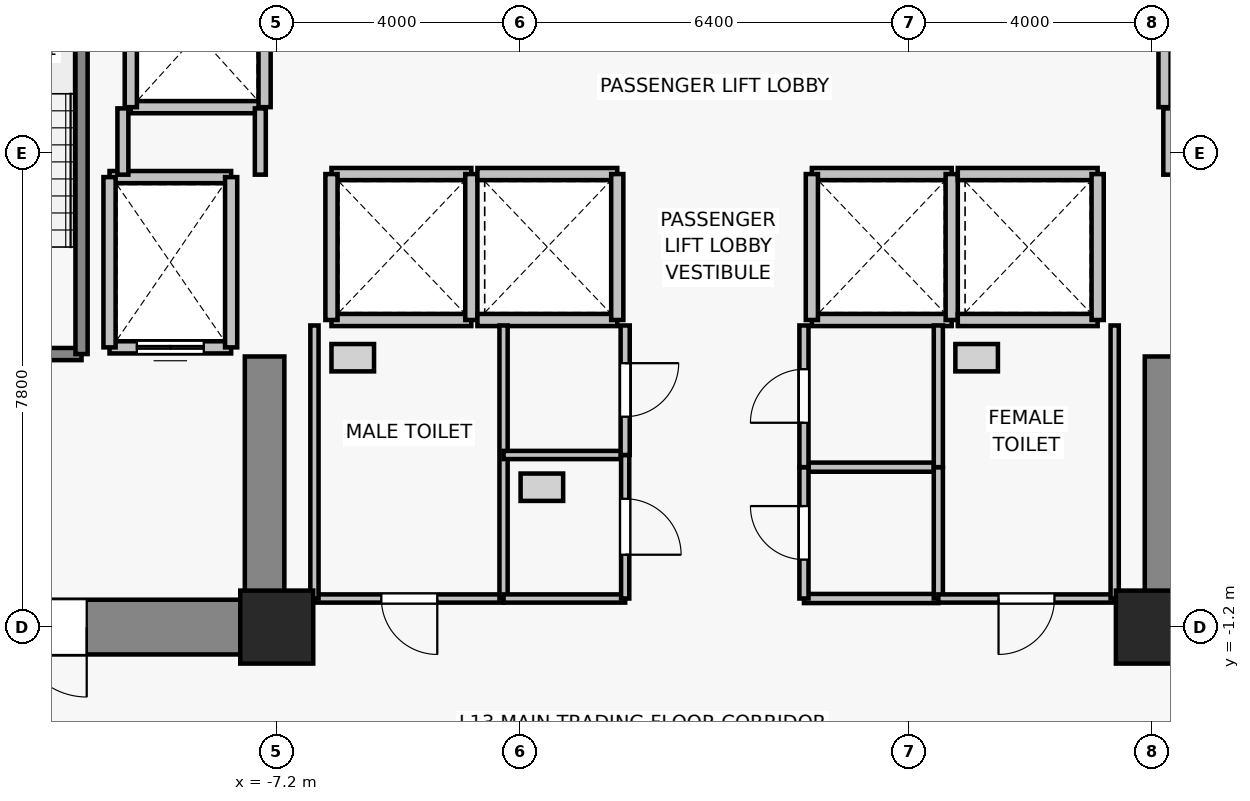
"""IFC4 building model, lengths in metres.
Left out: names, types, materials, properties, quantities, classifications, styles, units other than length and angle.
Written with IfcOpenShell. Run it as: python <this file> out.ifc"""

import sys

from ifc_helpers import new_model, si_unit, direction, frame, frame_2d, origin, origin_2d, place, context, subcontext, project, spatial, rectangle, extrude, source, transform, mapped, element, fill, save


model = new_model("IFC4")
c1 = context("Model", 3, precision=1e-05, world=origin(), true_north=direction((0.0, 1.0)))
c2 = subcontext(c1, "Body", "Model", "MODEL_VIEW")
j1 = project(units=[si_unit("LENGTHUNIT", "METRE"), si_unit("PLANEANGLEUNIT", "RADIAN")], contexts=[c1])
p1 = place(None, origin())
s1 = spatial("IfcSite", under=j1, at=p1, CompositionType="ELEMENT")
p2 = place(p1, origin())
s2 = spatial("IfcBuilding", under=s1, at=p2, CompositionType="ELEMENT")
p3 = place(p2, frame((0.0, 0.0, 50.5)))
s3 = spatial("IfcBuildingStorey", under=s2, at=p3, CompositionType="ELEMENT", Elevation=50.5)
for number, where, z_axis, x_axis in (
    (1, (-7.2, -1.2, 0.0), (0.0, 0.0, 1.0), (1.0, 0.0, 0.0)),
    (2, (7.2, -1.2, 0.0), (0.0, 0.0, 1.0), (1.0, 0.0, 0.0)),
):
    element("IfcColumn", number, at=place(p3, frame(where, z_axis=z_axis, x_axis=x_axis)), inside=s3, PredefinedType="COLUMN", context=c2, shape_type="SweptSolid", body=[
        extrude(rectangle(XDim=1.2, YDim=1.2, at=origin_2d()), origin(), (0.0, 0.0, 1.0), 3.3),
    ])
p4 = place(p3, frame((-7.8, -1.2, 0.0), z_axis=(0.0, 0.0, 1.0), x_axis=(-1.0, 0.0, 0.0)))
e3 = element("IfcWall", 3, at=p4, inside=s3, PredefinedType="SHEAR", context=c2, shape_type="SweptSolid", body=[
    extrude(rectangle(XDim=6.0, YDim=0.9, at=frame_2d((3.0, 0.0))), origin(), (0.0, 0.0, 1.0), 3.075),
])
p5 = place(p4, frame((2.525, 0.0, 0.0)))
e4 = element("IfcOpeningElement", 4, at=p5, cuts=e3, PredefinedType="OPENING", context=c2, shape_type="SweptSolid", body=[
    extrude(rectangle(XDim=1.15, YDim=2.15, at=frame_2d((0.575, 1.075))), frame((0.0, 0.46, 0.0), z_axis=(0.0, -1.0, 0.0), x_axis=(1.0, 0.0, 0.0)), (0.0, 0.0, 1.0), 0.92),
])
for number, where, z_axis, x_axis in (
    (5, (-7.4, -0.75, 0.0), (0.0, 0.0, 1.0), (0.0, 1.0, 0.0)),
    (6, (7.4, -0.75, 0.0), (0.0, 0.0, 1.0), (0.0, 1.0, 0.0)),
):
    element("IfcWall", number, at=place(p3, frame(where, z_axis=z_axis, x_axis=x_axis)), inside=s3, PredefinedType="SHEAR", context=c2, shape_type="SweptSolid", body=[
        extrude(rectangle(XDim=4.0, YDim=0.65, at=frame_2d((2.0, 0.0))), origin(), (0.0, 0.0, 1.0), 3.075),
    ])
p6 = place(p3, frame((-7.95, 3.4, 0.0), z_axis=(0.0, 0.0, 1.0), x_axis=(-1.0, 0.0, 0.0)))
e7 = element("IfcWall", 7, at=p6, inside=s3, PredefinedType="SOLIDWALL", context=c2, shape_type="SweptSolid", body=[
    extrude(rectangle(XDim=2.0, YDim=0.2, at=frame_2d((1.0, 0.0))), origin(), (0.0, 0.0, 1.0), 3.075),
])
p7 = place(p6, frame((0.45, 0.0, 0.0)))
e8 = element("IfcOpeningElement", 8, at=p7, cuts=e7, PredefinedType="OPENING", context=c2, shape_type="SweptSolid", body=[
    extrude(rectangle(XDim=1.1, YDim=2.2, at=frame_2d((0.55, 1.1))), frame((0.0, 0.11, 0.0), z_axis=(0.0, -1.0, 0.0), x_axis=(1.0, 0.0, 0.0)), (0.0, 0.0, 1.0), 0.22),
])
p8 = place(p3, frame((-9.95, 6.2, 0.0), z_axis=(0.0, 0.0, 1.0), x_axis=(1.0, 0.0, 0.0)))
e9 = element("IfcWall", 9, at=p8, inside=s3, PredefinedType="SOLIDWALL", context=c2, shape_type="SweptSolid", body=[
    extrude(rectangle(XDim=2.0, YDim=0.2, at=frame_2d((1.0, 0.0))), origin(), (0.0, 0.0, 1.0), 3.075),
])
for number, where, z_axis, x_axis in (
    (10, (-9.95, 3.4, 0.0), (0.0, 0.0, 1.0), (0.0, 1.0, 0.0)),
    (11, (-7.95, 6.2, 0.0), (0.0, 0.0, 1.0), (0.0, -1.0, 0.0)),
):
    element("IfcWall", number, at=place(p3, frame(where, z_axis=z_axis, x_axis=x_axis)), inside=s3, PredefinedType="SOLIDWALL", context=c2, shape_type="SweptSolid", body=[
        extrude(rectangle(XDim=2.8, YDim=0.2, at=frame_2d((1.4, 0.0))), origin(), (0.0, 0.0, 1.0), 3.075),
    ])
for number, where, z_axis, x_axis in (
    (12, (-4.0, 3.85, 0.0), (0.0, 0.0, 1.0), (-1.0, 0.0, 0.0)),
    (13, (-6.3, 6.25, 0.0), (0.0, 0.0, 1.0), (1.0, 0.0, 0.0)),
):
    element("IfcWall", number, at=place(p3, frame(where, z_axis=z_axis, x_axis=x_axis)), inside=s3, PredefinedType="SOLIDWALL", context=c2, shape_type="SweptSolid", body=[
        extrude(rectangle(XDim=2.3, YDim=0.2, at=frame_2d((1.15, 0.0))), origin(), (0.0, 0.0, 1.0), 3.075),
    ])
for number, where, z_axis, x_axis in (
    (14, (-6.3, 3.85, 0.0), (0.0, 0.0, 1.0), (0.0, 1.0, 0.0)),
    (15, (-4.0, 6.25, 0.0), (0.0, 0.0, 1.0), (0.0, -1.0, 0.0)),
):
    element("IfcWall", number, at=place(p3, frame(where, z_axis=z_axis, x_axis=x_axis)), inside=s3, PredefinedType="SOLIDWALL", context=c2, shape_type="SweptSolid", body=[
        extrude(rectangle(XDim=2.4, YDim=0.2, at=frame_2d((1.2, 0.0))), origin(), (0.0, 0.0, 1.0), 3.075),
    ])
for number, where, z_axis, x_axis in (
    (16, (-1.6, 3.85, 0.0), (0.0, 0.0, 1.0), (-1.0, 0.0, 0.0)),
    (17, (-3.9, 6.25, 0.0), (0.0, 0.0, 1.0), (1.0, 0.0, 0.0)),
):
    element("IfcWall", number, at=place(p3, frame(where, z_axis=z_axis, x_axis=x_axis)), inside=s3, PredefinedType="SOLIDWALL", context=c2, shape_type="SweptSolid", body=[
        extrude(rectangle(XDim=2.3, YDim=0.2, at=frame_2d((1.15, 0.0))), origin(), (0.0, 0.0, 1.0), 3.075),
    ])
p9 = place(p3, frame((-1.6, 6.25, 0.0), z_axis=(0.0, 0.0, 1.0), x_axis=(0.0, -1.0, 0.0)))
e18 = element("IfcWall", 18, at=p9, inside=s3, PredefinedType="SOLIDWALL", context=c2, shape_type="SweptSolid", body=[
    extrude(rectangle(XDim=2.4, YDim=0.2, at=frame_2d((1.2, 0.0))), origin(), (0.0, 0.0, 1.0), 3.075),
])
for number, where, z_axis, x_axis in (
    (19, (3.9, 3.85, 0.0), (0.0, 0.0, 1.0), (-1.0, 0.0, 0.0)),
    (20, (1.6, 6.25, 0.0), (0.0, 0.0, 1.0), (1.0, 0.0, 0.0)),
):
    element("IfcWall", number, at=place(p3, frame(where, z_axis=z_axis, x_axis=x_axis)), inside=s3, PredefinedType="SOLIDWALL", context=c2, shape_type="SweptSolid", body=[
        extrude(rectangle(XDim=2.3, YDim=0.2, at=frame_2d((1.15, 0.0))), origin(), (0.0, 0.0, 1.0), 3.075),
    ])
for number, where, z_axis, x_axis in (
    (21, (1.6, 3.85, 0.0), (0.0, 0.0, 1.0), (0.0, 1.0, 0.0)),
    (22, (3.9, 6.25, 0.0), (0.0, 0.0, 1.0), (0.0, -1.0, 0.0)),
):
    element("IfcWall", number, at=place(p3, frame(where, z_axis=z_axis, x_axis=x_axis)), inside=s3, PredefinedType="SOLIDWALL", context=c2, shape_type="SweptSolid", body=[
        extrude(rectangle(XDim=2.4, YDim=0.2, at=frame_2d((1.2, 0.0))), origin(), (0.0, 0.0, 1.0), 3.075),
    ])
for number, where, z_axis, x_axis in (
    (23, (6.3, 3.85, 0.0), (0.0, 0.0, 1.0), (-1.0, 0.0, 0.0)),
    (24, (4.0, 6.25, 0.0), (0.0, 0.0, 1.0), (1.0, 0.0, 0.0)),
):
    element("IfcWall", number, at=place(p3, frame(where, z_axis=z_axis, x_axis=x_axis)), inside=s3, PredefinedType="SOLIDWALL", context=c2, shape_type="SweptSolid", body=[
        extrude(rectangle(XDim=2.3, YDim=0.2, at=frame_2d((1.15, 0.0))), origin(), (0.0, 0.0, 1.0), 3.075),
    ])
p10 = place(p3, frame((6.3, 6.25, 0.0), z_axis=(0.0, 0.0, 1.0), x_axis=(0.0, -1.0, 0.0)))
e25 = element("IfcWall", 25, at=p10, inside=s3, PredefinedType="SOLIDWALL", context=c2, shape_type="SweptSolid", body=[
    extrude(rectangle(XDim=2.4, YDim=0.2, at=frame_2d((1.2, 0.0))), origin(), (0.0, 0.0, 1.0), 3.075),
])
p11 = place(p3, frame((-7.4, 7.35, 0.0), z_axis=(0.0, 0.0, 1.0), x_axis=(-1.0, 0.0, 0.0)))
e26 = element("IfcWall", 26, at=p11, inside=s3, PredefinedType="SOLIDWALL", context=c2, shape_type="SweptSolid", body=[
    extrude(rectangle(XDim=2.2, YDim=0.2, at=frame_2d((1.1, 0.0))), origin(), (0.0, 0.0, 1.0), 2.465),
])
p12 = place(p3, frame((-9.6, 7.35, 0.0), z_axis=(0.0, 0.0, 1.0), x_axis=(0.0, 1.0, 0.0)))
e27 = element("IfcWall", 27, at=p12, inside=s3, PredefinedType="SOLIDWALL", context=c2, shape_type="SweptSolid", body=[
    extrude(rectangle(XDim=2.4, YDim=0.2, at=frame_2d((1.2, 0.0))), origin(), (0.0, 0.0, 1.0), 3.075),
])
p13 = place(p3, frame((-7.4, 9.75, 0.0), z_axis=(0.0, 0.0, 1.0), x_axis=(0.0, -1.0, 0.0)))
e28 = element("IfcWall", 28, at=p13, inside=s3, PredefinedType="SOLIDWALL", context=c2, shape_type="SweptSolid", body=[
    extrude(rectangle(XDim=2.4, YDim=0.2, at=frame_2d((1.2, 0.0))), origin(), (0.0, 0.0, 1.0), 2.465),
])
p14 = place(p3, frame((9.6, 7.35, 0.0), z_axis=(0.0, 0.0, 1.0), x_axis=(-1.0, 0.0, 0.0)))
e29 = element("IfcWall", 29, at=p14, inside=s3, PredefinedType="SOLIDWALL", context=c2, shape_type="SweptSolid", body=[
    extrude(rectangle(XDim=2.2, YDim=0.2, at=frame_2d((1.1, 0.0))), origin(), (0.0, 0.0, 1.0), 2.465),
])
p15 = place(p3, frame((7.4, 7.35, 0.0), z_axis=(0.0, 0.0, 1.0), x_axis=(0.0, 1.0, 0.0)))
e30 = element("IfcWall", 30, at=p15, inside=s3, PredefinedType="SOLIDWALL", context=c2, shape_type="SweptSolid", body=[
    extrude(rectangle(XDim=2.4, YDim=0.2, at=frame_2d((1.2, 0.0))), origin(), (0.0, 0.0, 1.0), 2.465),
])
p16 = place(p3, frame((-10.41, 3.29, 0.0), z_axis=(0.0, 0.0, 1.0), x_axis=(-1.0, 0.0, 0.0)))
e31 = element("IfcWall", 31, at=p16, inside=s3, PredefinedType="SOLIDWALL", context=c2, shape_type="SweptSolid", body=[
    extrude(rectangle(XDim=3.52, YDim=0.2, at=frame_2d((1.76, 0.0))), origin(), (0.0, 0.0, 1.0), 3.075),
])
p17 = place(p16, frame((1.165, 0.0, 0.0)))
e32 = element("IfcOpeningElement", 32, at=p17, cuts=e31, PredefinedType="OPENING", context=c2, shape_type="SweptSolid", body=[
    extrude(rectangle(XDim=1.15, YDim=2.15, at=frame_2d((0.575, 1.075))), frame((0.0, 0.11, 0.0), z_axis=(0.0, -1.0, 0.0), x_axis=(1.0, 0.0, 0.0)), (0.0, 0.0, 1.0), 0.22),
])
p18 = place(p3, frame((-10.41, 12.13, 0.0), z_axis=(0.0, 0.0, 1.0), x_axis=(0.0, -1.0, 0.0)))
e33 = element("IfcWall", 33, at=p18, inside=s3, PredefinedType="SOLIDWALL", context=c2, shape_type="SweptSolid", body=[
    extrude(rectangle(XDim=8.84, YDim=0.2, at=frame_2d((4.42, 0.0))), origin(), (0.0, 0.0, 1.0), 3.075),
])
p19 = place(p3, frame((-9.73, 6.24, 0.0), z_axis=(0.0, 0.0, 1.0), x_axis=(0.0, 1.0, 0.0)))
e34 = element("IfcWall", 34, at=p19, inside=s3, PredefinedType="PARTITIONING", context=c2, shape_type="SweptSolid", body=[
    extrude(rectangle(XDim=1.09, YDim=0.18, at=frame_2d((0.545, 0.0))), origin(), (0.0, 0.0, 1.0), 3.075),
])
for number, where, z_axis, x_axis in (
    (35, (-7.47, 7.33, 0.0), (0.0, 0.0, 1.0), (0.0, -1.0, 0.0)),
    (36, (7.47, 6.24, 0.0), (0.0, 0.0, 1.0), (0.0, 1.0, 0.0)),
):
    element("IfcWall", number, at=place(p3, frame(where, z_axis=z_axis, x_axis=x_axis)), inside=s3, PredefinedType="PARTITIONING", context=c2, shape_type="SweptSolid", body=[
        extrude(rectangle(XDim=1.09, YDim=0.18, at=frame_2d((0.545, 0.0))), origin(), (0.0, 0.0, 1.0), 2.465),
    ])
p20 = place(p3, frame((-3.47, -0.73, 0.0), z_axis=(0.0, 0.0, 1.0), x_axis=(-1.0, 0.0, 0.0)))
e37 = element("IfcWall", 37, at=p20, inside=s3, PredefinedType="PARTITIONING", context=c2, shape_type="SweptSolid", body=[
    extrude(rectangle(XDim=3.11, YDim=0.135, at=frame_2d((1.555, 0.0))), origin(), (0.0, 0.0, 1.0), 3.075),
])
p21 = place(p20, frame((1.09, 0.0, 0.0)))
e38 = element("IfcOpeningElement", 38, at=p21, cuts=e37, PredefinedType="OPENING", context=c2, shape_type="SweptSolid", body=[
    extrude(rectangle(XDim=0.92, YDim=2.1, at=frame_2d((0.46, 1.05))), frame((0.0, 0.077, 0.0), z_axis=(0.0, -1.0, 0.0), x_axis=(1.0, 0.0, 0.0)), (0.0, 0.0, 1.0), 0.155),
])
for number, where, z_axis, x_axis in (
    (39, (-6.58, -0.73, 0.0), (0.0, 0.0, 1.0), (0.0, 1.0, 0.0)),
    (40, (-3.47, 3.76, 0.0), (0.0, 0.0, 1.0), (0.0, -1.0, 0.0)),
):
    element("IfcWall", number, at=place(p3, frame(where, z_axis=z_axis, x_axis=x_axis)), inside=s3, PredefinedType="PARTITIONING", context=c2, shape_type="SweptSolid", body=[
        extrude(rectangle(XDim=4.49, YDim=0.135, at=frame_2d((2.245, 0.0))), origin(), (0.0, 0.0, 1.0), 3.075),
    ])
for number, where, z_axis, x_axis in (
    (41, (-1.47, -0.73, 0.0), (0.0, 0.0, 1.0), (-1.0, 0.0, 0.0)),
    (42, (-3.47, 1.63, 0.0), (0.0, 0.0, 1.0), (1.0, 0.0, 0.0)),
):
    element("IfcWall", number, at=place(p3, frame(where, z_axis=z_axis, x_axis=x_axis)), inside=s3, PredefinedType="PARTITIONING", context=c2, shape_type="SweptSolid", body=[
        extrude(rectangle(XDim=2.0, YDim=0.135, at=frame_2d((1.0, 0.0))), origin(), (0.0, 0.0, 1.0), 3.075),
    ])
p22 = place(p3, frame((-1.47, 1.63, 0.0), z_axis=(0.0, 0.0, 1.0), x_axis=(0.0, -1.0, 0.0)))
e43 = element("IfcWall", 43, at=p22, inside=s3, PredefinedType="PARTITIONING", context=c2, shape_type="SweptSolid", body=[
    extrude(rectangle(XDim=2.36, YDim=0.135, at=frame_2d((1.18, 0.0))), origin(), (0.0, 0.0, 1.0), 3.075),
])
p23 = place(p22, frame((0.72, 0.0, 0.0)))
e44 = element("IfcOpeningElement", 44, at=p23, cuts=e43, PredefinedType="OPENING", context=c2, shape_type="SweptSolid", body=[
    extrude(rectangle(XDim=0.92, YDim=2.1, at=frame_2d((0.46, 1.05))), frame((0.0, 0.077, 0.0), z_axis=(0.0, -1.0, 0.0), x_axis=(1.0, 0.0, 0.0)), (0.0, 0.0, 1.0), 0.155),
])
p24 = place(p3, frame((-1.47, 3.76, 0.0), z_axis=(0.0, 0.0, 1.0), x_axis=(0.0, -1.0, 0.0)))
e45 = element("IfcWall", 45, at=p24, inside=s3, PredefinedType="PARTITIONING", context=c2, shape_type="SweptSolid", body=[
    extrude(rectangle(XDim=2.13, YDim=0.15, at=frame_2d((1.065, 0.0))), origin(), (0.0, 0.0, 1.0), 3.075),
])
p25 = place(p24, frame((0.62, 0.0, 0.0)))
e46 = element("IfcOpeningElement", 46, at=p25, cuts=e45, PredefinedType="OPENING", context=c2, shape_type="SweptSolid", body=[
    extrude(rectangle(XDim=0.88, YDim=2.1, at=frame_2d((0.44, 1.05))), frame((0.0, 0.085, 0.0), z_axis=(0.0, -1.0, 0.0), x_axis=(1.0, 0.0, 0.0)), (0.0, 0.0, 1.0), 0.17),
])
for number, where, z_axis, x_axis in (
    (47, (3.68, -0.73, 0.0), (0.0, 0.0, 1.0), (-1.0, 0.0, 0.0)),
    (48, (1.47, 1.43, 0.0), (0.0, 0.0, 1.0), (1.0, 0.0, 0.0)),
):
    element("IfcWall", number, at=place(p3, frame(where, z_axis=z_axis, x_axis=x_axis)), inside=s3, PredefinedType="PARTITIONING", context=c2, shape_type="SweptSolid", body=[
        extrude(rectangle(XDim=2.21, YDim=0.15, at=frame_2d((1.105, 0.0))), origin(), (0.0, 0.0, 1.0), 3.075),
    ])
p26 = place(p3, frame((1.47, -0.73, 0.0), z_axis=(0.0, 0.0, 1.0), x_axis=(0.0, 1.0, 0.0)))
e49 = element("IfcWall", 49, at=p26, inside=s3, PredefinedType="PARTITIONING", context=c2, shape_type="SweptSolid", body=[
    extrude(rectangle(XDim=2.16, YDim=0.15, at=frame_2d((1.08, 0.0))), origin(), (0.0, 0.0, 1.0), 3.075),
])
p27 = place(p26, frame((0.64, 0.0, 0.0)))
e50 = element("IfcOpeningElement", 50, at=p27, cuts=e49, PredefinedType="OPENING", context=c2, shape_type="SweptSolid", body=[
    extrude(rectangle(XDim=0.88, YDim=2.1, at=frame_2d((0.44, 1.05))), frame((0.0, 0.085, 0.0), z_axis=(0.0, -1.0, 0.0), x_axis=(1.0, 0.0, 0.0)), (0.0, 0.0, 1.0), 0.17),
])
p28 = place(p3, frame((3.68, 1.43, 0.0), z_axis=(0.0, 0.0, 1.0), x_axis=(0.0, -1.0, 0.0)))
e51 = element("IfcWall", 51, at=p28, inside=s3, PredefinedType="PARTITIONING", context=c2, shape_type="SweptSolid", body=[
    extrude(rectangle(XDim=2.16, YDim=0.15, at=frame_2d((1.08, 0.0))), origin(), (0.0, 0.0, 1.0), 3.075),
])
p29 = place(p3, frame((1.47, 1.43, 0.0), z_axis=(0.0, 0.0, 1.0), x_axis=(0.0, 1.0, 0.0)))
e52 = element("IfcWall", 52, at=p29, inside=s3, PredefinedType="PARTITIONING", context=c2, shape_type="SweptSolid", body=[
    extrude(rectangle(XDim=2.33, YDim=0.15, at=frame_2d((1.165, 0.0))), origin(), (0.0, 0.0, 1.0), 3.075),
])
p30 = place(p29, frame((0.73, 0.0, 0.0)))
e53 = element("IfcOpeningElement", 53, at=p30, cuts=e52, PredefinedType="OPENING", context=c2, shape_type="SweptSolid", body=[
    extrude(rectangle(XDim=0.88, YDim=2.15, at=frame_2d((0.44, 1.075))), frame((0.0, 0.085, 0.0), z_axis=(0.0, -1.0, 0.0), x_axis=(1.0, 0.0, 0.0)), (0.0, 0.0, 1.0), 0.17),
])
p31 = place(p3, frame((3.68, 3.76, 0.0), z_axis=(0.0, 0.0, 1.0), x_axis=(0.0, -1.0, 0.0)))
e54 = element("IfcWall", 54, at=p31, inside=s3, PredefinedType="PARTITIONING", context=c2, shape_type="SweptSolid", body=[
    extrude(rectangle(XDim=2.33, YDim=0.15, at=frame_2d((1.165, 0.0))), origin(), (0.0, 0.0, 1.0), 3.075),
])
p32 = place(p3, frame((6.58, -0.73, 0.0), z_axis=(0.0, 0.0, 1.0), x_axis=(-1.0, 0.0, 0.0)))
e55 = element("IfcWall", 55, at=p32, inside=s3, PredefinedType="PARTITIONING", context=c2, shape_type="SweptSolid", body=[
    extrude(rectangle(XDim=2.9, YDim=0.135, at=frame_2d((1.45, 0.0))), origin(), (0.0, 0.0, 1.0), 3.075),
])
p33 = place(p32, frame((0.99, 0.0, 0.0)))
e56 = element("IfcOpeningElement", 56, at=p33, cuts=e55, PredefinedType="OPENING", context=c2, shape_type="SweptSolid", body=[
    extrude(rectangle(XDim=0.92, YDim=2.1, at=frame_2d((0.46, 1.05))), frame((0.0, 0.077, 0.0), z_axis=(0.0, -1.0, 0.0), x_axis=(1.0, 0.0, 0.0)), (0.0, 0.0, 1.0), 0.155),
])
p34 = place(p3, frame((6.58, 3.76, 0.0), z_axis=(0.0, 0.0, 1.0), x_axis=(0.0, -1.0, 0.0)))
e57 = element("IfcWall", 57, at=p34, inside=s3, PredefinedType="PARTITIONING", context=c2, shape_type="SweptSolid", body=[
    extrude(rectangle(XDim=4.49, YDim=0.135, at=frame_2d((2.245, 0.0))), origin(), (0.0, 0.0, 1.0), 3.075),
])
m1 = source(origin(), c2, "Body", "SweptSolid", [
    extrude(rectangle(XDim=1.1, YDim=2.2, at=frame_2d((0.55, 1.1))), frame((0.0, 0.025, 0.0), z_axis=(0.0, -1.0, 0.0), x_axis=(1.0, 0.0, 0.0)), (0.0, 0.0, 1.0), 0.05),
])
p35 = place(p7, origin())
e58 = element("IfcDoor", 58, at=p35, inside=s3, OperationType="DOUBLE_DOOR_SLIDING", PredefinedType="DOOR", context=c2, shape_type="MappedRepresentation", body=[
    mapped(m1, transform((0.0, 0.0, 0.0), x_axis=(1.0, 0.0, 0.0), y_axis=(0.0, 1.0, 0.0), z_axis=(0.0, 0.0, 1.0), scale=1.0)),
])
fill(e8, e58)
m2 = source(origin(), c2, "Body", "SweptSolid", [
    extrude(rectangle(XDim=1.15, YDim=2.15, at=frame_2d((0.575, 1.075))), frame((0.0, 0.025, 0.0), z_axis=(0.0, -1.0, 0.0), x_axis=(1.0, 0.0, 0.0)), (0.0, 0.0, 1.0), 0.05),
])
p36 = place(p5, origin())
e59 = element("IfcDoor", 59, at=p36, inside=s3, OperationType="SINGLE_SWING_LEFT", PredefinedType="DOOR", context=c2, shape_type="MappedRepresentation", body=[
    mapped(m2, transform((0.0, 0.0, 0.0), x_axis=(1.0, 0.0, 0.0), y_axis=(0.0, 1.0, 0.0), z_axis=(0.0, 0.0, 1.0), scale=1.0)),
])
fill(e4, e59)
m3 = source(origin(), c2, "Body", "SweptSolid", [
    extrude(rectangle(XDim=0.92, YDim=2.1, at=frame_2d((0.46, 1.05))), frame((0.0, 0.025, 0.0), z_axis=(0.0, -1.0, 0.0), x_axis=(1.0, 0.0, 0.0)), (0.0, 0.0, 1.0), 0.05),
])
p37 = place(p21, origin())
e60 = element("IfcDoor", 60, at=p37, inside=s3, OperationType="SINGLE_SWING_LEFT", PredefinedType="DOOR", context=c2, shape_type="MappedRepresentation", body=[
    mapped(m3, transform((0.0, 0.0, 0.0), x_axis=(1.0, 0.0, 0.0), y_axis=(0.0, 1.0, 0.0), z_axis=(0.0, 0.0, 1.0), scale=1.0)),
])
fill(e38, e60)
p38 = place(p23, origin())
e61 = element("IfcDoor", 61, at=p38, inside=s3, OperationType="SINGLE_SWING_RIGHT", PredefinedType="DOOR", context=c2, shape_type="MappedRepresentation", body=[
    mapped(m3, transform((0.0, 0.0, 0.0), x_axis=(1.0, 0.0, 0.0), y_axis=(0.0, 1.0, 0.0), z_axis=(0.0, 0.0, 1.0), scale=1.0)),
])
fill(e44, e61)
m4 = source(origin(), c2, "Body", "SweptSolid", [
    extrude(rectangle(XDim=0.88, YDim=2.1, at=frame_2d((0.44, 1.05))), frame((0.0, 0.025, 0.0), z_axis=(0.0, -1.0, 0.0), x_axis=(1.0, 0.0, 0.0)), (0.0, 0.0, 1.0), 0.05),
])
p39 = place(p25, origin())
e62 = element("IfcDoor", 62, at=p39, inside=s3, OperationType="SINGLE_SWING_LEFT", PredefinedType="DOOR", context=c2, shape_type="MappedRepresentation", body=[
    mapped(m4, transform((0.0, 0.0, 0.0), x_axis=(1.0, 0.0, 0.0), y_axis=(0.0, 1.0, 0.0), z_axis=(0.0, 0.0, 1.0), scale=1.0)),
])
fill(e46, e62)
p40 = place(p27, origin())
e63 = element("IfcDoor", 63, at=p40, inside=s3, OperationType="SINGLE_SWING_RIGHT", PredefinedType="DOOR", context=c2, shape_type="MappedRepresentation", body=[
    mapped(m4, transform((0.0, 0.0, 0.0), x_axis=(1.0, 0.0, 0.0), y_axis=(0.0, 1.0, 0.0), z_axis=(0.0, 0.0, 1.0), scale=1.0)),
])
fill(e50, e63)
m5 = source(origin(), c2, "Body", "SweptSolid", [
    extrude(rectangle(XDim=0.88, YDim=2.15, at=frame_2d((0.44, 1.075))), frame((0.0, 0.025, 0.0), z_axis=(0.0, -1.0, 0.0), x_axis=(1.0, 0.0, 0.0)), (0.0, 0.0, 1.0), 0.05),
])
p41 = place(p30, origin())
e64 = element("IfcDoor", 64, at=p41, inside=s3, OperationType="SINGLE_SWING_LEFT", PredefinedType="DOOR", context=c2, shape_type="MappedRepresentation", body=[
    mapped(m5, transform((0.0, 0.0, 0.0), x_axis=(1.0, 0.0, 0.0), y_axis=(0.0, 1.0, 0.0), z_axis=(0.0, 0.0, 1.0), scale=1.0)),
])
fill(e53, e64)
p42 = place(p33, origin())
e65 = element("IfcDoor", 65, at=p42, inside=s3, OperationType="SINGLE_SWING_RIGHT", PredefinedType="DOOR", context=c2, shape_type="MappedRepresentation", body=[
    mapped(m3, transform((0.0, 0.0, 0.0), x_axis=(1.0, 0.0, 0.0), y_axis=(0.0, 1.0, 0.0), z_axis=(0.0, 0.0, 1.0), scale=1.0)),
])
fill(e56, e65)
save(model, sys.argv[1])
